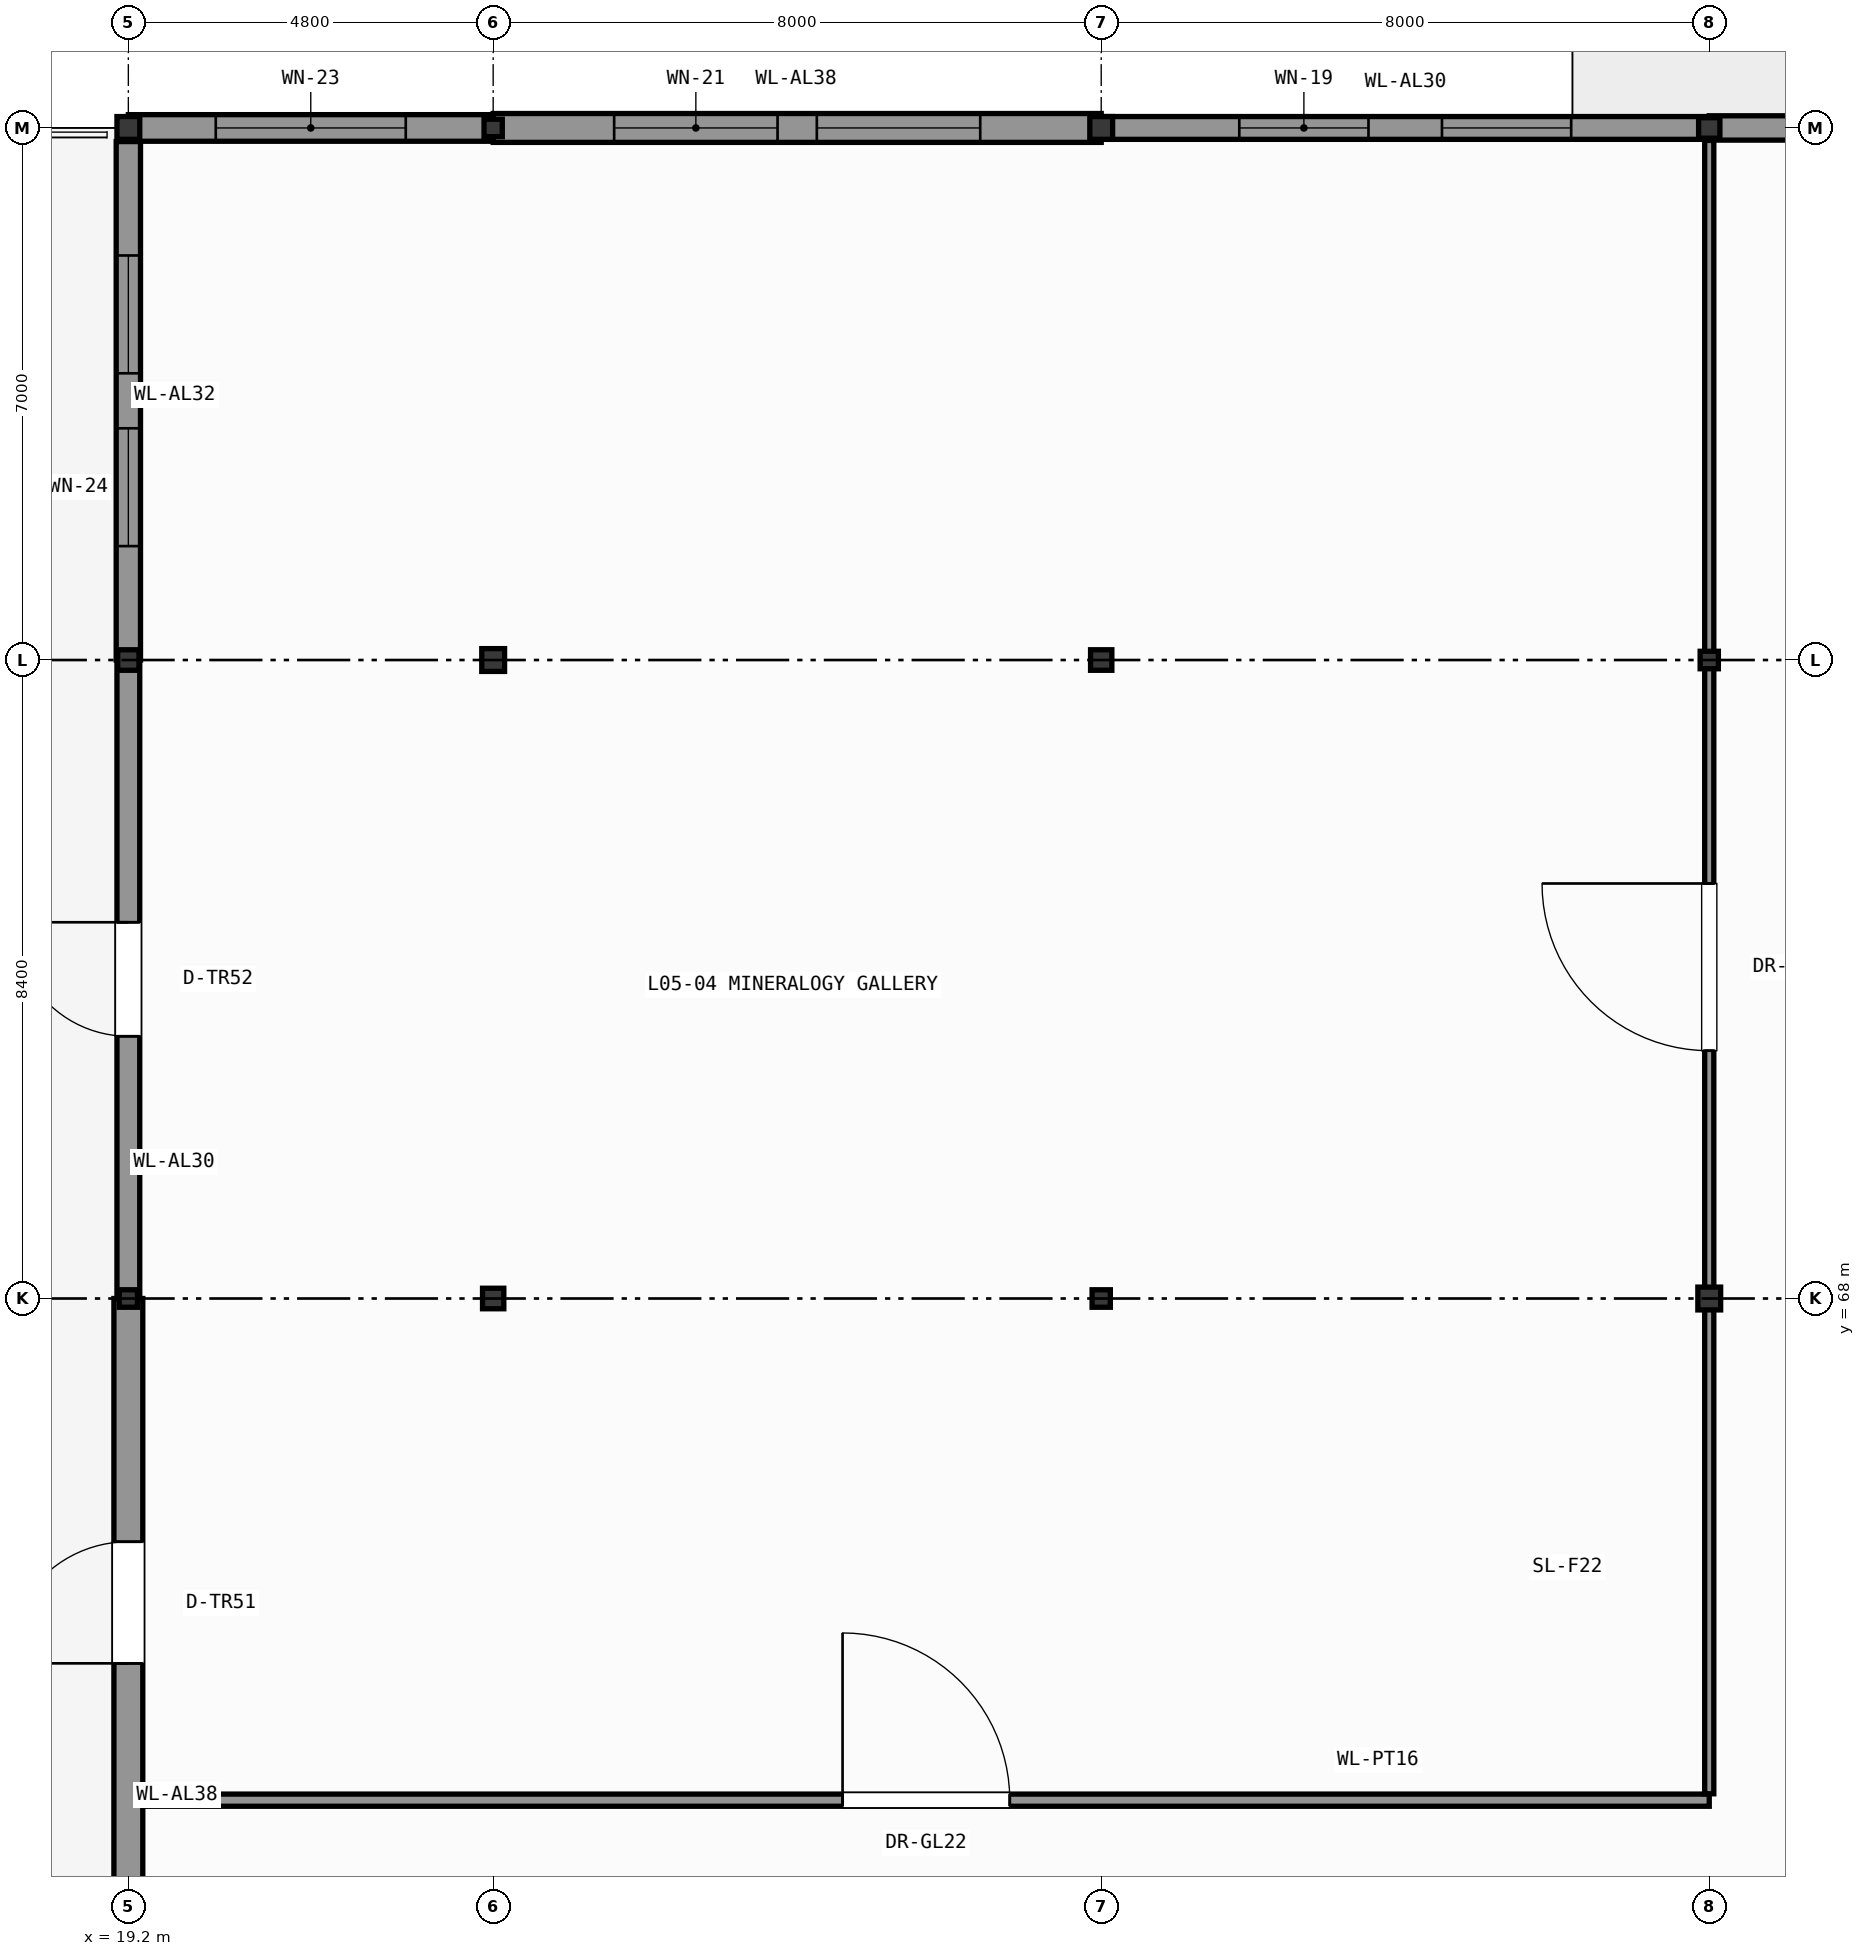
"""IFC4 building model, lengths in metres.
Left out: names, types, materials, properties, quantities, classifications, styles, units other than length and angle.
Written with IfcOpenShell. Run it as: python <this file> out.ifc"""

import sys

from ifc_helpers import new_model, si_unit, direction, frame, frame_2d, origin, origin_2d, place, context, subcontext, project, spatial, rectangle, i_section, extrude, element, fill, save


model = new_model("IFC4")
c1 = context("Model", 3, precision=1e-05, world=origin(), true_north=direction((0.0, 1.0)))
c2 = subcontext(c1, "Body", "Model", "MODEL_VIEW")
j1 = project(units=[si_unit("LENGTHUNIT", "METRE"), si_unit("PLANEANGLEUNIT", "RADIAN")], contexts=[c1])
p1 = place(None, origin())
s1 = spatial("IfcSite", under=j1, at=p1, CompositionType="ELEMENT")
p2 = place(p1, origin())
s2 = spatial("IfcBuilding", under=s1, at=p2, CompositionType="ELEMENT")
p3 = place(p2, frame((0.0, 0.0, 22.2)))
s3 = spatial("IfcBuildingStorey", under=s2, at=p3, CompositionType="ELEMENT", Elevation=22.2)
p4 = place(p3, frame((19.2, 68.0, 0.0), z_axis=(0.0, 0.0, 1.0), x_axis=(1.0, 0.0, 0.0)))
e1 = element("IfcColumn", 1, at=p4, inside=s3, PredefinedType="COLUMN", context=c2, shape_type="SweptSolid", body=[
    extrude(i_section(OverallWidth=0.24, OverallDepth=0.23, WebThickness=0.008, FlangeThickness=0.012, FilletRadius=0.021, at=origin_2d()), origin(), (0.0, 0.0, 1.0), 4.2),
])
p5 = place(p3, frame((19.2, 76.4, 0.0), z_axis=(0.0, 0.0, 1.0), x_axis=(1.0, 0.0, 0.0)))
e2 = element("IfcColumn", 2, at=p5, inside=s3, PredefinedType="COLUMN", context=c2, shape_type="SweptSolid", body=[
    extrude(i_section(OverallWidth=0.28, OverallDepth=0.27, WebThickness=0.008, FlangeThickness=0.013, FilletRadius=0.024, at=origin_2d()), origin(), (0.0, 0.0, 1.0), 4.2),
])
p6 = place(p3, frame((19.2, 83.4, 0.0), z_axis=(0.0, 0.0, 1.0), x_axis=(1.0, 0.0, 0.0)))
e3 = element("IfcColumn", 3, at=p6, inside=s3, PredefinedType="COLUMN", context=c2, shape_type="SweptSolid", body=[
    extrude(i_section(OverallWidth=0.3, OverallDepth=0.3, WebThickness=0.011, FlangeThickness=0.019, FilletRadius=0.027, at=origin_2d()), origin(), (0.0, 0.0, 1.0), 4.2),
])
p7 = place(p3, frame((24.0, 68.0, 0.0), z_axis=(0.0, 0.0, 1.0), x_axis=(1.0, 0.0, 0.0)))
e4 = element("IfcColumn", 4, at=p7, inside=s3, PredefinedType="COLUMN", context=c2, shape_type="SweptSolid", body=[
    extrude(i_section(OverallWidth=0.28, OverallDepth=0.27, WebThickness=0.008, FlangeThickness=0.013, FilletRadius=0.024, at=origin_2d()), origin(), (0.0, 0.0, 1.0), 4.2),
])
p8 = place(p3, frame((24.0, 76.4, 0.0), z_axis=(0.0, 0.0, 1.0), x_axis=(1.0, 0.0, 0.0)))
e5 = element("IfcColumn", 5, at=p8, inside=s3, PredefinedType="COLUMN", context=c2, shape_type="SweptSolid", body=[
    extrude(i_section(OverallWidth=0.3, OverallDepth=0.3, WebThickness=0.011, FlangeThickness=0.019, FilletRadius=0.027, at=origin_2d()), origin(), (0.0, 0.0, 1.0), 4.2),
])
for number, where, z_axis, x_axis in (
    (6, (24.0, 83.4, 0.0), (0.0, 0.0, 1.0), (1.0, 0.0, 0.0)),
    (7, (32.0, 68.0, 0.0), (0.0, 0.0, 1.0), (1.0, 0.0, 0.0)),
):
    element("IfcColumn", number, at=place(p3, frame(where, z_axis=z_axis, x_axis=x_axis)), inside=s3, PredefinedType="COLUMN", context=c2, shape_type="SweptSolid", body=[
        extrude(i_section(OverallWidth=0.24, OverallDepth=0.23, WebThickness=0.008, FlangeThickness=0.012, FilletRadius=0.021, at=origin_2d()), origin(), (0.0, 0.0, 1.0), 4.2),
    ])
p9 = place(p3, frame((32.0, 76.4, 0.0), z_axis=(0.0, 0.0, 1.0), x_axis=(1.0, 0.0, 0.0)))
e8 = element("IfcColumn", 8, at=p9, inside=s3, PredefinedType="COLUMN", context=c2, shape_type="SweptSolid", body=[
    extrude(i_section(OverallWidth=0.28, OverallDepth=0.27, WebThickness=0.008, FlangeThickness=0.013, FilletRadius=0.024, at=origin_2d()), origin(), (0.0, 0.0, 1.0), 4.2),
])
for number, where, z_axis, x_axis in (
    (9, (32.0, 83.4, 0.0), (0.0, 0.0, 1.0), (1.0, 0.0, 0.0)),
    (10, (40.0, 68.0, 0.0), (0.0, 0.0, 1.0), (1.0, 0.0, 0.0)),
):
    element("IfcColumn", number, at=place(p3, frame(where, z_axis=z_axis, x_axis=x_axis)), inside=s3, PredefinedType="COLUMN", context=c2, shape_type="SweptSolid", body=[
        extrude(i_section(OverallWidth=0.3, OverallDepth=0.3, WebThickness=0.011, FlangeThickness=0.019, FilletRadius=0.027, at=origin_2d()), origin(), (0.0, 0.0, 1.0), 4.2),
    ])
p10 = place(p3, frame((40.0, 76.4, 0.0), z_axis=(0.0, 0.0, 1.0), x_axis=(1.0, 0.0, 0.0)))
e11 = element("IfcColumn", 11, at=p10, inside=s3, PredefinedType="COLUMN", context=c2, shape_type="SweptSolid", body=[
    extrude(i_section(OverallWidth=0.24, OverallDepth=0.23, WebThickness=0.008, FlangeThickness=0.012, FilletRadius=0.021, at=origin_2d()), origin(), (0.0, 0.0, 1.0), 4.2),
])
p11 = place(p3, frame((40.0, 83.4, 0.0), z_axis=(0.0, 0.0, 1.0), x_axis=(1.0, 0.0, 0.0)))
e12 = element("IfcColumn", 12, at=p11, inside=s3, PredefinedType="COLUMN", context=c2, shape_type="SweptSolid", body=[
    extrude(i_section(OverallWidth=0.28, OverallDepth=0.27, WebThickness=0.008, FlangeThickness=0.013, FilletRadius=0.024, at=origin_2d()), origin(), (0.0, 0.0, 1.0), 4.2),
])
p12 = place(p3, frame((40.0, 83.4, 0.0), z_axis=(0.0, 0.0, 1.0), x_axis=(1.0, 0.0, 0.0)))
e13 = element("IfcWall", 13, at=p12, inside=s3, PredefinedType="SOLIDWALL", context=c2, shape_type="SweptSolid", body=[
    extrude(rectangle(XDim=8.0, YDim=0.32, at=frame_2d((4.0, 0.0))), origin(), (0.0, 0.0, 1.0), 3.705),
])
p13 = place(p12, frame((2.017, 0.0, 0.95)))
e14 = element("IfcOpeningElement", 14, at=p13, cuts=e13, PredefinedType="OPENING", context=c2, shape_type="SweptSolid", body=[
    extrude(rectangle(XDim=1.3, YDim=2.3, at=frame_2d((0.65, 1.15))), frame((0.0, 0.17, 0.0), z_axis=(0.0, -1.0, 0.0), x_axis=(1.0, 0.0, 0.0)), (0.0, 0.0, 1.0), 0.34),
])
p14 = place(p12, frame((4.683, 0.0, 0.95)))
e15 = element("IfcOpeningElement", 15, at=p14, cuts=e13, PredefinedType="OPENING", context=c2, shape_type="SweptSolid", body=[
    extrude(rectangle(XDim=1.3, YDim=2.3, at=frame_2d((0.65, 1.15))), frame((0.0, 0.17, 0.0), z_axis=(0.0, -1.0, 0.0), x_axis=(1.0, 0.0, 0.0)), (0.0, 0.0, 1.0), 0.34),
])
p15 = place(p3, frame((32.0, 83.4, 0.0), z_axis=(0.0, 0.0, 1.0), x_axis=(1.0, 0.0, 0.0)))
e16 = element("IfcWall", 16, at=p15, inside=s3, PredefinedType="SOLIDWALL", context=c2, shape_type="SweptSolid", body=[
    extrude(rectangle(XDim=8.0, YDim=0.3, at=frame_2d((4.0, 0.0))), origin(), (0.0, 0.0, 1.0), 3.485),
])
p16 = place(p15, frame((1.817, 0.0, 0.95)))
e17 = element("IfcOpeningElement", 17, at=p16, cuts=e16, PredefinedType="OPENING", context=c2, shape_type="SweptSolid", body=[
    extrude(rectangle(XDim=1.7, YDim=2.13, at=frame_2d((0.85, 1.065))), frame((0.0, 0.16, 0.0), z_axis=(0.0, -1.0, 0.0), x_axis=(1.0, 0.0, 0.0)), (0.0, 0.0, 1.0), 0.32),
])
p17 = place(p15, frame((4.483, 0.0, 0.95)))
e18 = element("IfcOpeningElement", 18, at=p17, cuts=e16, PredefinedType="OPENING", context=c2, shape_type="SweptSolid", body=[
    extrude(rectangle(XDim=1.7, YDim=2.13, at=frame_2d((0.85, 1.065))), frame((0.0, 0.16, 0.0), z_axis=(0.0, -1.0, 0.0), x_axis=(1.0, 0.0, 0.0)), (0.0, 0.0, 1.0), 0.32),
])
p18 = place(p3, frame((24.0, 83.4, 0.0), z_axis=(0.0, 0.0, 1.0), x_axis=(1.0, 0.0, 0.0)))
e19 = element("IfcWall", 19, at=p18, inside=s3, PredefinedType="SOLIDWALL", context=c2, shape_type="SweptSolid", body=[
    extrude(rectangle(XDim=8.0, YDim=0.38, at=frame_2d((4.0, 0.0))), origin(), (0.0, 0.0, 1.0), 3.585),
])
p19 = place(p18, frame((1.592, 0.0, 0.95)))
e20 = element("IfcOpeningElement", 20, at=p19, cuts=e19, PredefinedType="OPENING", context=c2, shape_type="SweptSolid", body=[
    extrude(rectangle(XDim=2.15, YDim=2.24, at=frame_2d((1.075, 1.12))), frame((0.0, 0.2, 0.0), z_axis=(0.0, -1.0, 0.0), x_axis=(1.0, 0.0, 0.0)), (0.0, 0.0, 1.0), 0.4),
])
p20 = place(p18, frame((4.258, 0.0, 0.95)))
e21 = element("IfcOpeningElement", 21, at=p20, cuts=e19, PredefinedType="OPENING", context=c2, shape_type="SweptSolid", body=[
    extrude(rectangle(XDim=2.15, YDim=2.24, at=frame_2d((1.075, 1.12))), frame((0.0, 0.2, 0.0), z_axis=(0.0, -1.0, 0.0), x_axis=(1.0, 0.0, 0.0)), (0.0, 0.0, 1.0), 0.4),
])
p21 = place(p3, frame((19.2, 83.4, 0.0), z_axis=(0.0, 0.0, 1.0), x_axis=(1.0, 0.0, 0.0)))
e22 = element("IfcWall", 22, at=p21, inside=s3, PredefinedType="SOLIDWALL", context=c2, shape_type="SweptSolid", body=[
    extrude(rectangle(XDim=4.8, YDim=0.35, at=frame_2d((2.4, 0.0))), origin(), (0.0, 0.0, 1.0), 3.685),
])
p22 = place(p21, frame((1.15, 0.0, 0.95)))
e23 = element("IfcOpeningElement", 23, at=p22, cuts=e22, PredefinedType="OPENING", context=c2, shape_type="SweptSolid", body=[
    extrude(rectangle(XDim=2.5, YDim=2.34, at=frame_2d((1.25, 1.17))), frame((0.0, 0.185, 0.0), z_axis=(0.0, -1.0, 0.0), x_axis=(1.0, 0.0, 0.0)), (0.0, 0.0, 1.0), 0.37),
])
p23 = place(p3, frame((19.2, 76.4, 0.0), z_axis=(0.0, 0.0, 1.0), x_axis=(0.0, 1.0, 0.0)))
e24 = element("IfcWall", 24, at=p23, inside=s3, PredefinedType="SOLIDWALL", context=c2, shape_type="SweptSolid", body=[
    extrude(rectangle(XDim=6.821, YDim=0.32, at=frame_2d((3.411, 0.0))), origin(), (0.0, 0.0, 1.0), 3.695),
])
p24 = place(p23, frame((1.499, 0.0, 0.95)))
e25 = element("IfcOpeningElement", 25, at=p24, cuts=e24, PredefinedType="OPENING", context=c2, shape_type="SweptSolid", body=[
    extrude(rectangle(XDim=1.55, YDim=2.1, at=frame_2d((0.775, 1.05))), frame((0.0, 0.17, 0.0), z_axis=(0.0, -1.0, 0.0), x_axis=(1.0, 0.0, 0.0)), (0.0, 0.0, 1.0), 0.34),
])
p25 = place(p23, frame((3.772, 0.0, 0.95)))
e26 = element("IfcOpeningElement", 26, at=p25, cuts=e24, PredefinedType="OPENING", context=c2, shape_type="SweptSolid", body=[
    extrude(rectangle(XDim=1.55, YDim=2.1, at=frame_2d((0.775, 1.05))), frame((0.0, 0.17, 0.0), z_axis=(0.0, -1.0, 0.0), x_axis=(1.0, 0.0, 0.0)), (0.0, 0.0, 1.0), 0.34),
])
p26 = place(p3, frame((19.2, 68.0, 0.0), z_axis=(0.0, 0.0, 1.0), x_axis=(0.0, 1.0, 0.0)))
e27 = element("IfcWall", 27, at=p26, inside=s3, PredefinedType="SOLIDWALL", context=c2, shape_type="SweptSolid", body=[
    extrude(rectangle(XDim=8.4, YDim=0.3, at=frame_2d((4.2, 0.0))), origin(), (0.0, 0.0, 1.0), 3.545),
])
p27 = place(p26, frame((3.45, 0.0, 0.0)))
e28 = element("IfcOpeningElement", 28, at=p27, cuts=e27, PredefinedType="OPENING", context=c2, shape_type="SweptSolid", body=[
    extrude(rectangle(XDim=1.5, YDim=2.3, at=frame_2d((0.75, 1.15))), frame((0.0, 0.16, 0.0), z_axis=(0.0, -1.0, 0.0), x_axis=(1.0, 0.0, 0.0)), (0.0, 0.0, 1.0), 0.32),
])
p28 = place(p3, frame((19.2, 59.6, 0.0), z_axis=(0.0, 0.0, 1.0), x_axis=(0.0, 1.0, 0.0)))
e29 = element("IfcWall", 29, at=p28, inside=s3, PredefinedType="SOLIDWALL", context=c2, shape_type="SweptSolid", body=[
    extrude(rectangle(XDim=8.4, YDim=0.38, at=frame_2d((4.2, 0.0))), origin(), (0.0, 0.0, 1.0), 3.545),
])
p29 = place(p28, frame((3.6, 0.0, 0.0)))
e30 = element("IfcOpeningElement", 30, at=p29, cuts=e29, PredefinedType="OPENING", context=c2, shape_type="SweptSolid", body=[
    extrude(rectangle(XDim=1.6, YDim=2.4, at=frame_2d((0.8, 1.2))), frame((0.0, 0.2, 0.0), z_axis=(0.0, -1.0, 0.0), x_axis=(1.0, 0.0, 0.0)), (0.0, 0.0, 1.0), 0.4),
])
p30 = place(p3, frame((19.394, 61.4, 0.0), z_axis=(0.0, 0.0, 1.0), x_axis=(1.0, 0.0, 0.0)))
e31 = element("IfcWall", 31, at=p30, inside=s3, PredefinedType="PARTITIONING", context=c2, shape_type="SweptSolid", body=[
    extrude(rectangle(XDim=20.606, YDim=0.16, at=frame_2d((10.303, 0.0))), origin(), (0.0, 0.0, 1.0), 3.98),
])
p31 = place(p30, frame((9.203, 0.0, 0.0)))
e32 = element("IfcOpeningElement", 32, at=p31, cuts=e31, PredefinedType="OPENING", context=c2, shape_type="SweptSolid", body=[
    extrude(rectangle(XDim=2.2, YDim=2.6, at=frame_2d((1.1, 1.3))), frame((0.0, 0.09, 0.0), z_axis=(0.0, -1.0, 0.0), x_axis=(1.0, 0.0, 0.0)), (0.0, 0.0, 1.0), 0.18),
])
p32 = place(p3, frame((40.0, 61.484, 0.0), z_axis=(0.0, 0.0, 1.0), x_axis=(0.0, 1.0, 0.0)))
e33 = element("IfcWall", 33, at=p32, inside=s3, PredefinedType="PARTITIONING", context=c2, shape_type="SweptSolid", body=[
    extrude(rectangle(XDim=21.752, YDim=0.12, at=frame_2d((10.876, 0.0))), origin(), (0.0, 0.0, 1.0), 3.485),
])
p33 = place(p32, frame((9.776, 0.0, 0.0)))
e34 = element("IfcOpeningElement", 34, at=p33, cuts=e33, PredefinedType="OPENING", context=c2, shape_type="SweptSolid", body=[
    extrude(rectangle(XDim=2.2, YDim=2.6, at=frame_2d((1.1, 1.3))), frame((0.0, 0.07, 0.0), z_axis=(0.0, -1.0, 0.0), x_axis=(1.0, 0.0, 0.0)), (0.0, 0.0, 1.0), 0.14),
])
p34 = place(p16, origin())
e35 = element("IfcWindow", 35, at=p34, inside=s3, PartitioningType="SINGLE_PANEL", PredefinedType="WINDOW", context=c2, shape_type="SweptSolid", body=[
    extrude(rectangle(XDim=1.7, YDim=2.13, at=frame_2d((0.85, 1.065))), frame((0.0, 0.03, 0.0), z_axis=(0.0, -1.0, 0.0), x_axis=(1.0, 0.0, 0.0)), (0.0, 0.0, 1.0), 0.06),
])
fill(e17, e35)
p35 = place(p17, origin())
e36 = element("IfcWindow", 36, at=p35, inside=s3, PartitioningType="SINGLE_PANEL", PredefinedType="WINDOW", context=c2, shape_type="SweptSolid", body=[
    extrude(rectangle(XDim=1.7, YDim=2.13, at=frame_2d((0.85, 1.065))), frame((0.0, 0.03, 0.0), z_axis=(0.0, -1.0, 0.0), x_axis=(1.0, 0.0, 0.0)), (0.0, 0.0, 1.0), 0.06),
])
fill(e18, e36)
p36 = place(p19, origin())
e37 = element("IfcWindow", 37, at=p36, inside=s3, PartitioningType="SINGLE_PANEL", PredefinedType="WINDOW", context=c2, shape_type="SweptSolid", body=[
    extrude(rectangle(XDim=2.15, YDim=2.24, at=frame_2d((1.075, 1.12))), frame((0.0, 0.03, 0.0), z_axis=(0.0, -1.0, 0.0), x_axis=(1.0, 0.0, 0.0)), (0.0, 0.0, 1.0), 0.06),
])
fill(e20, e37)
p37 = place(p20, origin())
e38 = element("IfcWindow", 38, at=p37, inside=s3, PartitioningType="SINGLE_PANEL", PredefinedType="WINDOW", context=c2, shape_type="SweptSolid", body=[
    extrude(rectangle(XDim=2.15, YDim=2.24, at=frame_2d((1.075, 1.12))), frame((0.0, 0.03, 0.0), z_axis=(0.0, -1.0, 0.0), x_axis=(1.0, 0.0, 0.0)), (0.0, 0.0, 1.0), 0.06),
])
fill(e21, e38)
p38 = place(p22, origin())
e39 = element("IfcWindow", 39, at=p38, inside=s3, PartitioningType="SINGLE_PANEL", PredefinedType="WINDOW", context=c2, shape_type="SweptSolid", body=[
    extrude(rectangle(XDim=2.5, YDim=2.34, at=frame_2d((1.25, 1.17))), frame((0.0, 0.03, 0.0), z_axis=(0.0, -1.0, 0.0), x_axis=(1.0, 0.0, 0.0)), (0.0, 0.0, 1.0), 0.06),
])
fill(e23, e39)
p39 = place(p24, origin())
e40 = element("IfcWindow", 40, at=p39, inside=s3, PartitioningType="SINGLE_PANEL", PredefinedType="WINDOW", context=c2, shape_type="SweptSolid", body=[
    extrude(rectangle(XDim=1.55, YDim=2.1, at=frame_2d((0.775, 1.05))), frame((0.0, 0.03, 0.0), z_axis=(0.0, -1.0, 0.0), x_axis=(1.0, 0.0, 0.0)), (0.0, 0.0, 1.0), 0.06),
])
fill(e25, e40)
p40 = place(p25, origin())
e41 = element("IfcWindow", 41, at=p40, inside=s3, PartitioningType="SINGLE_PANEL", PredefinedType="WINDOW", context=c2, shape_type="SweptSolid", body=[
    extrude(rectangle(XDim=1.55, YDim=2.1, at=frame_2d((0.775, 1.05))), frame((0.0, 0.03, 0.0), z_axis=(0.0, -1.0, 0.0), x_axis=(1.0, 0.0, 0.0)), (0.0, 0.0, 1.0), 0.06),
])
fill(e26, e41)
p41 = place(p27, origin())
e42 = element("IfcDoor", 42, at=p41, inside=s3, OperationType="SINGLE_SWING_RIGHT", PredefinedType="DOOR", context=c2, shape_type="SweptSolid", body=[
    extrude(rectangle(XDim=1.5, YDim=2.3, at=frame_2d((0.75, 1.15))), frame((0.0, 0.025, 0.0), z_axis=(0.0, -1.0, 0.0), x_axis=(1.0, 0.0, 0.0)), (0.0, 0.0, 1.0), 0.05),
])
fill(e28, e42)
p42 = place(p29, origin())
e43 = element("IfcDoor", 43, at=p42, inside=s3, OperationType="SINGLE_SWING_LEFT", PredefinedType="DOOR", context=c2, shape_type="SweptSolid", body=[
    extrude(rectangle(XDim=1.6, YDim=2.4, at=frame_2d((0.8, 1.2))), frame((0.0, 0.025, 0.0), z_axis=(0.0, -1.0, 0.0), x_axis=(1.0, 0.0, 0.0)), (0.0, 0.0, 1.0), 0.05),
])
fill(e30, e43)
p43 = place(p31, origin())
e44 = element("IfcDoor", 44, at=p43, inside=s3, OperationType="SINGLE_SWING_LEFT", PredefinedType="DOOR", context=c2, shape_type="SweptSolid", body=[
    extrude(rectangle(XDim=2.2, YDim=2.6, at=frame_2d((1.1, 1.3))), frame((0.0, 0.025, 0.0), z_axis=(0.0, -1.0, 0.0), x_axis=(1.0, 0.0, 0.0)), (0.0, 0.0, 1.0), 0.05),
])
fill(e32, e44)
p44 = place(p33, origin())
e45 = element("IfcDoor", 45, at=p44, inside=s3, OperationType="SINGLE_SWING_RIGHT", PredefinedType="DOOR", context=c2, shape_type="SweptSolid", body=[
    extrude(rectangle(XDim=2.2, YDim=2.6, at=frame_2d((1.1, 1.3))), frame((0.0, 0.025, 0.0), z_axis=(0.0, -1.0, 0.0), x_axis=(1.0, 0.0, 0.0)), (0.0, 0.0, 1.0), 0.05),
])
fill(e34, e45)
save(model, sys.argv[1])
